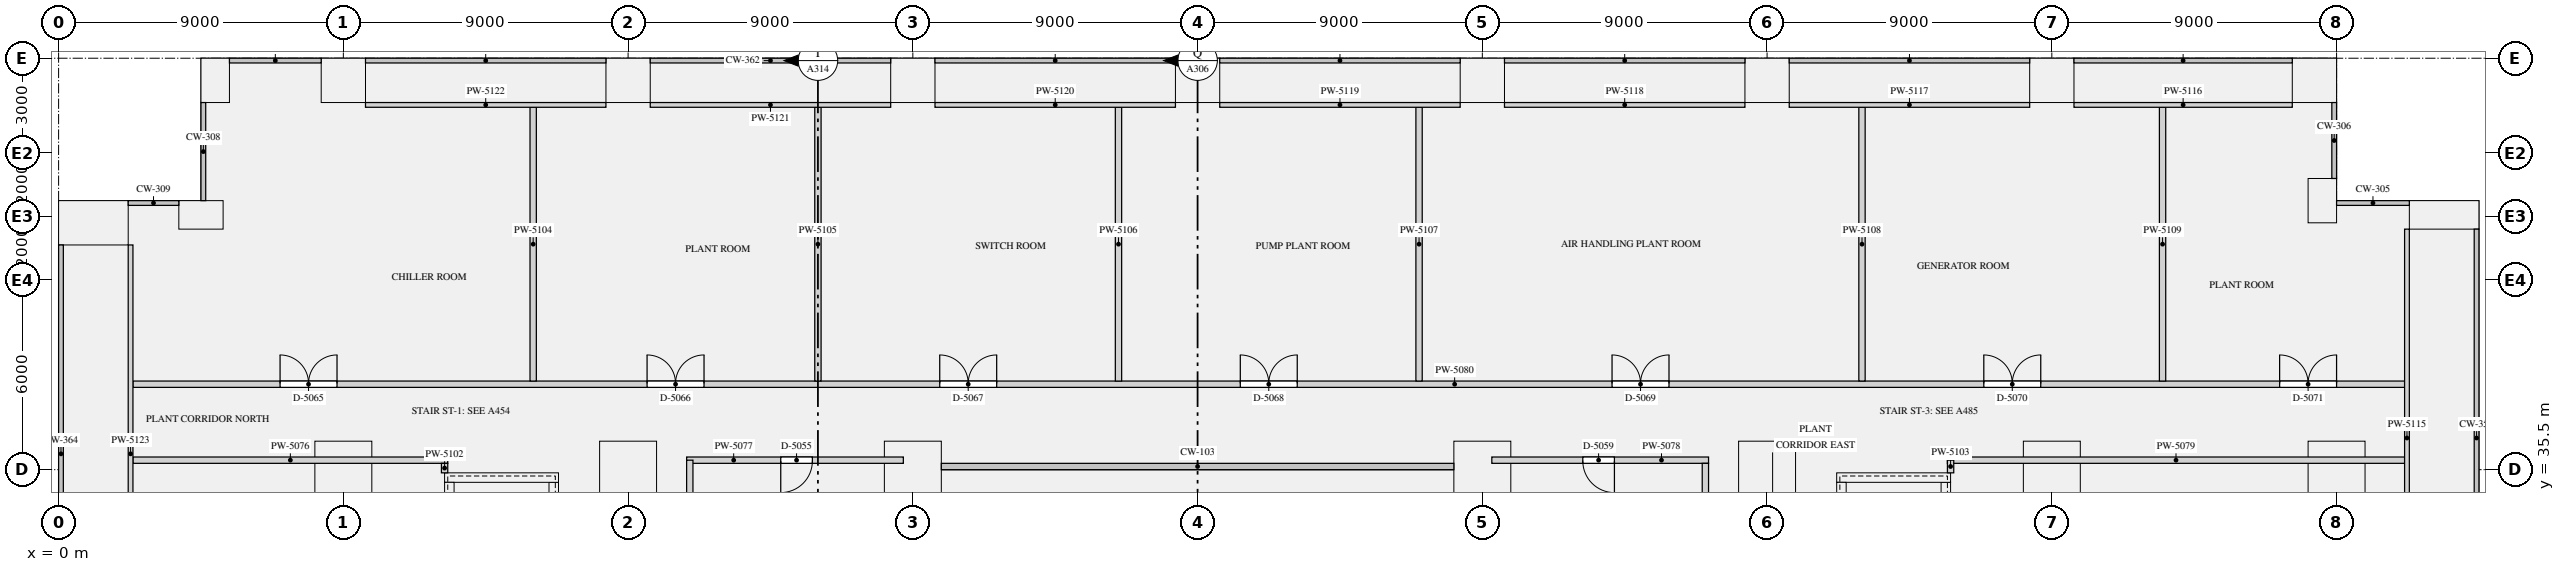
"""IFC4 building model, lengths in metres.
Left out: names, types, materials, properties, quantities, classifications, styles, units other than length and angle.
Written with IfcOpenShell. Run it as: python <this file> out.ifc"""

import sys

from ifc_helpers import new_model, si_unit, direction, frame, frame_2d, origin, origin_2d, place, context, subcontext, project, spatial, rectangle, extrude, element, fill, save


model = new_model("IFC4")
c1 = context("Model", 3, precision=1e-05, world=origin(), true_north=direction((0.0, 1.0)))
c2 = subcontext(c1, "Body", "Model", "MODEL_VIEW")
j1 = project(units=[si_unit("LENGTHUNIT", "METRE"), si_unit("PLANEANGLEUNIT", "RADIAN")], contexts=[c1])
p1 = place(None, origin())
s1 = spatial("IfcSite", under=j1, at=p1, CompositionType="ELEMENT")
p2 = place(p1, origin())
s2 = spatial("IfcBuilding", under=s1, at=p2, CompositionType="ELEMENT")
p3 = place(p2, frame((0.0, 0.0, 15.5)))
s3 = spatial("IfcBuildingStorey", under=s2, at=p3, CompositionType="ELEMENT", Elevation=15.5)
p4 = place(p3, frame((75.4, 43.55, 0.0), z_axis=(0.0, 0.0, 1.0), x_axis=(-1.0, 0.0, 0.0)))
e1 = element("IfcColumn", 1, at=p4, inside=s3, PredefinedType="USERDEFINED", context=c2, shape_type="SweptSolid", body=[
    extrude(rectangle(XDim=2.2, YDim=0.9, at=origin_2d()), origin(), (0.0, 0.0, 1.0), 4.0),
])
p5 = place(p3, frame((71.55, 44.0, 0.0), z_axis=(0.0, 0.0, 1.0), x_axis=(0.0, 1.0, 0.0)))
e2 = element("IfcColumn", 2, at=p5, inside=s3, PredefinedType="USERDEFINED", context=c2, shape_type="SweptSolid", body=[
    extrude(rectangle(XDim=1.4, YDim=0.9, at=origin_2d()), origin(), (0.0, 0.0, 1.0), 4.0),
])
for number, where, z_axis, x_axis in (
    (3, (71.3, 47.8, 0.0), (0.0, 0.0, 1.0), (-1.0, 0.0, 0.0)),
    (4, (63.0, 47.8, 0.0), (0.0, 0.0, 1.0), (-1.0, 0.0, 0.0)),
    (5, (54.0, 47.8, 0.0), (0.0, 0.0, 1.0), (-1.0, 0.0, 0.0)),
    (6, (45.0, 47.8, 0.0), (0.0, 0.0, 1.0), (-1.0, 0.0, 0.0)),
    (7, (36.0, 47.8, 0.0), (0.0, 0.0, 1.0), (-1.0, 0.0, 0.0)),
    (8, (27.0, 47.8, 0.0), (0.0, 0.0, 1.0), (-1.0, 0.0, 0.0)),
    (9, (18.0, 47.8, 0.0), (0.0, 0.0, 1.0), (-1.0, 0.0, 0.0)),
    (10, (9.0, 47.8, 0.0), (0.0, 0.0, 1.0), (-1.0, 0.0, 0.0)),
):
    element("IfcColumn", number, at=place(p3, frame(where, z_axis=z_axis, x_axis=x_axis)), inside=s3, PredefinedType="USERDEFINED", context=c2, shape_type="SweptSolid", body=[
        extrude(rectangle(XDim=1.4, YDim=1.4, at=origin_2d()), origin(), (0.0, 0.0, 1.0), 4.0),
    ])
for number, where, z_axis, x_axis in (
    (11, (4.95, 47.8, 0.0), (0.0, 0.0, 1.0), (0.0, -1.0, 0.0)),
    (12, (4.5, 43.55, 0.0), (0.0, 0.0, 1.0), (-1.0, 0.0, 0.0)),
):
    element("IfcColumn", number, at=place(p3, frame(where, z_axis=z_axis, x_axis=x_axis)), inside=s3, PredefinedType="USERDEFINED", context=c2, shape_type="SweptSolid", body=[
        extrude(rectangle(XDim=1.4, YDim=0.9, at=origin_2d()), origin(), (0.0, 0.0, 1.0), 4.0),
    ])
p6 = place(p3, frame((1.1, 43.3, 0.0), z_axis=(0.0, 0.0, 1.0), x_axis=(0.0, -1.0, 0.0)))
e13 = element("IfcColumn", 13, at=p6, inside=s3, PredefinedType="USERDEFINED", context=c2, shape_type="SweptSolid", body=[
    extrude(rectangle(XDim=1.4, YDim=2.2, at=origin_2d()), origin(), (0.0, 0.0, 1.0), 4.0),
])
for number, where, z_axis, x_axis in (
    (14, (9.0, 35.5, 0.0), (0.0, 0.0, 1.0), (1.0, 0.0, 0.0)),
    (15, (18.0, 35.5, 0.0), (0.0, 0.0, 1.0), (1.0, 0.0, 0.0)),
    (16, (27.0, 35.5, 0.0), (0.0, 0.0, 1.0), (1.0, 0.0, 0.0)),
    (17, (45.0, 35.5, 0.0), (0.0, 0.0, 1.0), (1.0, 0.0, 0.0)),
    (18, (54.0, 35.5, 0.0), (0.0, 0.0, 1.0), (1.0, 0.0, 0.0)),
    (19, (63.0, 35.5, 0.0), (0.0, 0.0, 1.0), (1.0, 0.0, 0.0)),
    (20, (72.0, 35.5, 0.0), (0.0, 0.0, 1.0), (1.0, 0.0, 0.0)),
):
    element("IfcColumn", number, at=place(p3, frame(where, z_axis=z_axis, x_axis=x_axis)), inside=s3, PredefinedType="COLUMN", context=c2, shape_type="SweptSolid", body=[
        extrude(rectangle(XDim=1.8, YDim=1.8, at=origin_2d()), origin(), (0.0, 0.0, 1.0), 4.0),
    ])
p7 = place(p3, frame((12.2, 35.25, 0.0), z_axis=(0.0, 0.0, 1.0), x_axis=(1.0, 0.0, 0.0)))
e21 = element("IfcWall", 21, at=p7, inside=s3, PredefinedType="SHEAR", context=c2, shape_type="SweptSolid", body=[
    extrude(rectangle(XDim=3.6, YDim=0.3, at=frame_2d((1.8, 0.0))), origin(), (0.0, 0.0, 1.0), 4.0),
])
for number, where, z_axis, x_axis in (
    (22, (12.35, 27.3, 0.0), (0.0, 0.0, 1.0), (0.0, 1.0, 0.0)),
    (23, (15.65, 27.3, 0.0), (0.0, 0.0, 1.0), (0.0, 1.0, 0.0)),
):
    element("IfcWall", number, at=place(p3, frame(where, z_axis=z_axis, x_axis=x_axis)), inside=s3, PredefinedType="SHEAR", context=c2, shape_type="SweptSolid", body=[
        extrude(rectangle(XDim=7.8, YDim=0.3, at=frame_2d((3.9, 0.0))), origin(), (0.0, 0.0, 1.0), 4.0),
    ])
p8 = place(p3, frame((56.2, 35.25, 0.0), z_axis=(0.0, 0.0, 1.0), x_axis=(1.0, 0.0, 0.0)))
e24 = element("IfcWall", 24, at=p8, inside=s3, PredefinedType="SHEAR", context=c2, shape_type="SweptSolid", body=[
    extrude(rectangle(XDim=3.6, YDim=0.3, at=frame_2d((1.8, 0.0))), origin(), (0.0, 0.0, 1.0), 4.0),
])
for number, where, z_axis, x_axis in (
    (25, (56.35, 27.3, 0.0), (0.0, 0.0, 1.0), (0.0, 1.0, 0.0)),
    (26, (59.65, 27.3, 0.0), (0.0, 0.0, 1.0), (0.0, 1.0, 0.0)),
):
    element("IfcWall", number, at=place(p3, frame(where, z_axis=z_axis, x_axis=x_axis)), inside=s3, PredefinedType="SHEAR", context=c2, shape_type="SweptSolid", body=[
        extrude(rectangle(XDim=7.8, YDim=0.3, at=frame_2d((3.9, 0.0))), origin(), (0.0, 0.0, 1.0), 4.0),
    ])
p9 = place(p3, frame((2.35, 35.8, 0.0), z_axis=(0.0, 0.0, 1.0), x_axis=(1.0, 0.0, 0.0)))
e27 = element("IfcWall", 27, at=p9, inside=s3, PredefinedType="PARTITIONING", context=c2, shape_type="SweptSolid", body=[
    extrude(rectangle(XDim=9.95, YDim=0.2, at=frame_2d((4.975, 0.0))), origin(), (0.0, 0.0, 1.0), 3.68),
])
p10 = place(p3, frame((19.85, 35.8, 0.0), z_axis=(0.0, 0.0, 1.0), x_axis=(1.0, 0.0, 0.0)))
e28 = element("IfcWall", 28, at=p10, inside=s3, PredefinedType="PARTITIONING", context=c2, shape_type="SweptSolid", body=[
    extrude(rectangle(XDim=6.85, YDim=0.2, at=frame_2d((3.425, 0.0))), origin(), (0.0, 0.0, 1.0), 3.68),
])
p11 = place(p10, frame((2.975, 0.0, 0.0)))
e29 = element("IfcOpeningElement", 29, at=p11, cuts=e28, PredefinedType="OPENING", context=c2, shape_type="SweptSolid", body=[
    extrude(rectangle(XDim=1.0, YDim=2.1, at=frame_2d((0.5, 1.05))), frame((0.0, 0.11, 0.0), z_axis=(0.0, -1.0, 0.0), x_axis=(1.0, 0.0, 0.0)), (0.0, 0.0, 1.0), 0.22),
])
p12 = place(p3, frame((45.3, 35.8, 0.0), z_axis=(0.0, 0.0, 1.0), x_axis=(1.0, 0.0, 0.0)))
e30 = element("IfcWall", 30, at=p12, inside=s3, PredefinedType="PARTITIONING", context=c2, shape_type="SweptSolid", body=[
    extrude(rectangle(XDim=6.85, YDim=0.2, at=frame_2d((3.425, 0.0))), origin(), (0.0, 0.0, 1.0), 3.68),
])
p13 = place(p12, frame((2.875, 0.0, 0.0)))
e31 = element("IfcOpeningElement", 31, at=p13, cuts=e30, PredefinedType="OPENING", context=c2, shape_type="SweptSolid", body=[
    extrude(rectangle(XDim=1.0, YDim=2.1, at=frame_2d((0.5, 1.05))), frame((0.0, 0.11, 0.0), z_axis=(0.0, -1.0, 0.0), x_axis=(1.0, 0.0, 0.0)), (0.0, 0.0, 1.0), 0.22),
])
p14 = place(p3, frame((59.7, 35.8, 0.0), z_axis=(0.0, 0.0, 1.0), x_axis=(1.0, 0.0, 0.0)))
e32 = element("IfcWall", 32, at=p14, inside=s3, PredefinedType="PARTITIONING", context=c2, shape_type="SweptSolid", body=[
    extrude(rectangle(XDim=14.45, YDim=0.2, at=frame_2d((7.225, 0.0))), origin(), (0.0, 0.0, 1.0), 3.68),
])
p15 = place(p3, frame((2.35, 38.2, 0.0), z_axis=(0.0, 0.0, 1.0), x_axis=(1.0, 0.0, 0.0)))
e33 = element("IfcWall", 33, at=p15, inside=s3, PredefinedType="PARTITIONING", context=c2, shape_type="SweptSolid", body=[
    extrude(rectangle(XDim=71.8, YDim=0.2, at=frame_2d((35.9, 0.0))), origin(), (0.0, 0.0, 1.0), 3.68),
])
p16 = place(p15, frame((4.65, 0.0, 0.0)))
e34 = element("IfcOpeningElement", 34, at=p16, cuts=e33, PredefinedType="OPENING", context=c2, shape_type="SweptSolid", body=[
    extrude(rectangle(XDim=1.8, YDim=2.1, at=frame_2d((0.9, 1.05))), frame((0.0, 0.11, 0.0), z_axis=(0.0, -1.0, 0.0), x_axis=(1.0, 0.0, 0.0)), (0.0, 0.0, 1.0), 0.22),
])
p17 = place(p15, frame((16.25, 0.0, 0.0)))
e35 = element("IfcOpeningElement", 35, at=p17, cuts=e33, PredefinedType="OPENING", context=c2, shape_type="SweptSolid", body=[
    extrude(rectangle(XDim=1.8, YDim=2.1, at=frame_2d((0.9, 1.05))), frame((0.0, 0.11, 0.0), z_axis=(0.0, -1.0, 0.0), x_axis=(1.0, 0.0, 0.0)), (0.0, 0.0, 1.0), 0.22),
])
p18 = place(p15, frame((25.5, 0.0, 0.0)))
e36 = element("IfcOpeningElement", 36, at=p18, cuts=e33, PredefinedType="OPENING", context=c2, shape_type="SweptSolid", body=[
    extrude(rectangle(XDim=1.8, YDim=2.1, at=frame_2d((0.9, 1.05))), frame((0.0, 0.11, 0.0), z_axis=(0.0, -1.0, 0.0), x_axis=(1.0, 0.0, 0.0)), (0.0, 0.0, 1.0), 0.22),
])
p19 = place(p15, frame((35.0, 0.0, 0.0)))
e37 = element("IfcOpeningElement", 37, at=p19, cuts=e33, PredefinedType="OPENING", context=c2, shape_type="SweptSolid", body=[
    extrude(rectangle(XDim=1.8, YDim=2.1, at=frame_2d((0.9, 1.05))), frame((0.0, 0.11, 0.0), z_axis=(0.0, -1.0, 0.0), x_axis=(1.0, 0.0, 0.0)), (0.0, 0.0, 1.0), 0.22),
])
p20 = place(p15, frame((46.75, 0.0, 0.0)))
e38 = element("IfcOpeningElement", 38, at=p20, cuts=e33, PredefinedType="OPENING", context=c2, shape_type="SweptSolid", body=[
    extrude(rectangle(XDim=1.8, YDim=2.1, at=frame_2d((0.9, 1.05))), frame((0.0, 0.11, 0.0), z_axis=(0.0, -1.0, 0.0), x_axis=(1.0, 0.0, 0.0)), (0.0, 0.0, 1.0), 0.22),
])
p21 = place(p15, frame((58.5, 0.0, 0.0)))
e39 = element("IfcOpeningElement", 39, at=p21, cuts=e33, PredefinedType="OPENING", context=c2, shape_type="SweptSolid", body=[
    extrude(rectangle(XDim=1.8, YDim=2.1, at=frame_2d((0.9, 1.05))), frame((0.0, 0.11, 0.0), z_axis=(0.0, -1.0, 0.0), x_axis=(1.0, 0.0, 0.0)), (0.0, 0.0, 1.0), 0.22),
])
p22 = place(p15, frame((67.85, 0.0, 0.0)))
e40 = element("IfcOpeningElement", 40, at=p22, cuts=e33, PredefinedType="OPENING", context=c2, shape_type="SweptSolid", body=[
    extrude(rectangle(XDim=1.8, YDim=2.1, at=frame_2d((0.9, 1.05))), frame((0.0, 0.11, 0.0), z_axis=(0.0, -1.0, 0.0), x_axis=(1.0, 0.0, 0.0)), (0.0, 0.0, 1.0), 0.22),
])
p23 = place(p3, frame((19.95, 23.0, 0.0), z_axis=(0.0, 0.0, 1.0), x_axis=(0.0, 1.0, 0.0)))
e41 = element("IfcWall", 41, at=p23, inside=s3, PredefinedType="PARTITIONING", context=c2, shape_type="SweptSolid", body=[
    extrude(rectangle(XDim=12.8, YDim=0.2, at=frame_2d((6.4, 0.0))), origin(), (0.0, 0.0, 1.0), 3.68),
])
p24 = place(p23, frame((2.75, 0.0, 0.0)))
e42 = element("IfcOpeningElement", 42, at=p24, cuts=e41, PredefinedType="OPENING", context=c2, shape_type="SweptSolid", body=[
    extrude(rectangle(XDim=1.0, YDim=2.1, at=frame_2d((0.5, 1.05))), frame((0.0, 0.11, 0.0), z_axis=(0.0, -1.0, 0.0), x_axis=(1.0, 0.0, 0.0)), (0.0, 0.0, 1.0), 0.22),
])
p25 = place(p3, frame((52.05, 30.6, 0.0), z_axis=(0.0, 0.0, 1.0), x_axis=(0.0, 1.0, 0.0)))
e43 = element("IfcWall", 43, at=p25, inside=s3, PredefinedType="PARTITIONING", context=c2, shape_type="SweptSolid", body=[
    extrude(rectangle(XDim=5.1, YDim=0.2, at=frame_2d((2.55, 0.0))), origin(), (0.0, 0.0, 1.0), 3.68),
])
p26 = place(p3, frame((12.2, 35.4, 0.0), z_axis=(0.0, 0.0, 1.0), x_axis=(0.0, 1.0, 0.0)))
e44 = element("IfcWall", 44, at=p26, inside=s3, PredefinedType="PARTITIONING", context=c2, shape_type="SweptSolid", body=[
    extrude(rectangle(XDim=0.3, YDim=0.2, at=frame_2d((0.15, 0.0))), origin(), (0.0, 0.0, 1.0), 3.68),
])
p27 = place(p3, frame((59.8, 35.4, 0.0), z_axis=(0.0, 0.0, 1.0), x_axis=(0.0, 1.0, 0.0)))
e45 = element("IfcWall", 45, at=p27, inside=s3, PredefinedType="PARTITIONING", context=c2, shape_type="SweptSolid", body=[
    extrude(rectangle(XDim=0.4, YDim=0.2, at=frame_2d((0.2, 0.0))), origin(), (0.0, 0.0, 1.0), 3.68),
])
for number, where, z_axis, x_axis in (
    (46, (15.0, 38.3, 0.0), (0.0, 0.0, 1.0), (0.0, 1.0, 0.0)),
    (47, (24.0, 38.3, 0.0), (0.0, 0.0, 1.0), (0.0, 1.0, 0.0)),
    (48, (33.5, 38.3, 0.0), (0.0, 0.0, 1.0), (0.0, 1.0, 0.0)),
    (49, (43.0, 38.3, 0.0), (0.0, 0.0, 1.0), (0.0, 1.0, 0.0)),
    (50, (57.0, 38.3, 0.0), (0.0, 0.0, 1.0), (0.0, 1.0, 0.0)),
    (51, (66.5, 38.3, 0.0), (0.0, 0.0, 1.0), (0.0, 1.0, 0.0)),
):
    element("IfcWall", number, at=place(p3, frame(where, z_axis=z_axis, x_axis=x_axis)), inside=s3, PredefinedType="PARTITIONING", context=c2, shape_type="SweptSolid", body=[
        extrude(rectangle(XDim=8.65, YDim=0.2, at=frame_2d((4.325, 0.0))), origin(), (0.0, 0.0, 1.0), 3.68),
    ])
p28 = place(p3, frame((74.225, 29.9, 0.0), z_axis=(0.0, 0.0, 1.0), x_axis=(0.0, 1.0, 0.0)))
e52 = element("IfcWall", 52, at=p28, inside=s3, PredefinedType="PARTITIONING", context=c2, shape_type="SweptSolid", body=[
    extrude(rectangle(XDim=13.2, YDim=0.15, at=frame_2d((6.6, 0.0))), origin(), (0.0, 0.0, 1.0), 3.68),
])
p29 = place(p3, frame((63.7, 47.025, 0.0), z_axis=(0.0, 0.0, 1.0), x_axis=(1.0, 0.0, 0.0)))
e53 = element("IfcWall", 53, at=p29, inside=s3, PredefinedType="PARTITIONING", context=c2, shape_type="SweptSolid", body=[
    extrude(rectangle(XDim=6.9, YDim=0.15, at=frame_2d((3.45, 0.0))), origin(), (0.0, 0.0, 1.0), 3.68),
])
for number, where, z_axis, x_axis in (
    (54, (54.7, 47.025, 0.0), (0.0, 0.0, 1.0), (1.0, 0.0, 0.0)),
    (55, (45.7, 47.025, 0.0), (0.0, 0.0, 1.0), (1.0, 0.0, 0.0)),
    (56, (36.7, 47.025, 0.0), (0.0, 0.0, 1.0), (1.0, 0.0, 0.0)),
    (57, (27.7, 47.025, 0.0), (0.0, 0.0, 1.0), (1.0, 0.0, 0.0)),
    (58, (18.7, 47.025, 0.0), (0.0, 0.0, 1.0), (1.0, 0.0, 0.0)),
    (59, (9.7, 47.025, 0.0), (0.0, 0.0, 1.0), (1.0, 0.0, 0.0)),
):
    element("IfcWall", number, at=place(p3, frame(where, z_axis=z_axis, x_axis=x_axis)), inside=s3, PredefinedType="PARTITIONING", context=c2, shape_type="SweptSolid", body=[
        extrude(rectangle(XDim=7.6, YDim=0.15, at=frame_2d((3.8, 0.0))), origin(), (0.0, 0.0, 1.0), 3.68),
    ])
p30 = place(p3, frame((2.275, 29.4, 0.0), z_axis=(0.0, 0.0, 1.0), x_axis=(0.0, 1.0, 0.0)))
e60 = element("IfcWall", 60, at=p30, inside=s3, PredefinedType="PARTITIONING", context=c2, shape_type="SweptSolid", body=[
    extrude(rectangle(XDim=13.2, YDim=0.15, at=frame_2d((6.6, 0.0))), origin(), (0.0, 0.0, 1.0), 3.68),
])
p31 = place(p11, frame((1.0, 0.0, 0.0), z_axis=(0.0, 0.0, 1.0), x_axis=(-1.0, 0.0, 0.0)))
e61 = element("IfcDoor", 61, at=p31, inside=s3, OperationType="SINGLE_SWING_RIGHT", PredefinedType="DOOR", context=c2, shape_type="SweptSolid", body=[
    extrude(rectangle(XDim=1.0, YDim=2.1, at=frame_2d((0.5, 1.05))), frame((0.0, 0.025, 0.0), z_axis=(0.0, -1.0, 0.0), x_axis=(1.0, 0.0, 0.0)), (0.0, 0.0, 1.0), 0.05),
])
fill(e29, e61)
p32 = place(p13, frame((1.0, 0.0, 0.0), z_axis=(0.0, 0.0, 1.0), x_axis=(-1.0, 0.0, 0.0)))
e62 = element("IfcDoor", 62, at=p32, inside=s3, OperationType="SINGLE_SWING_LEFT", PredefinedType="DOOR", context=c2, shape_type="SweptSolid", body=[
    extrude(rectangle(XDim=1.0, YDim=2.1, at=frame_2d((0.5, 1.05))), frame((0.0, 0.025, 0.0), z_axis=(0.0, -1.0, 0.0), x_axis=(1.0, 0.0, 0.0)), (0.0, 0.0, 1.0), 0.05),
])
fill(e31, e62)
p33 = place(p16, origin())
e63 = element("IfcDoor", 63, at=p33, inside=s3, OperationType="DOUBLE_DOOR_SINGLE_SWING", PredefinedType="DOOR", context=c2, shape_type="SweptSolid", body=[
    extrude(rectangle(XDim=1.8, YDim=2.1, at=frame_2d((0.9, 1.05))), frame((0.0, 0.025, 0.0), z_axis=(0.0, -1.0, 0.0), x_axis=(1.0, 0.0, 0.0)), (0.0, 0.0, 1.0), 0.05),
])
fill(e34, e63)
p34 = place(p17, origin())
e64 = element("IfcDoor", 64, at=p34, inside=s3, OperationType="DOUBLE_DOOR_SINGLE_SWING", PredefinedType="DOOR", context=c2, shape_type="SweptSolid", body=[
    extrude(rectangle(XDim=1.8, YDim=2.1, at=frame_2d((0.9, 1.05))), frame((0.0, 0.025, 0.0), z_axis=(0.0, -1.0, 0.0), x_axis=(1.0, 0.0, 0.0)), (0.0, 0.0, 1.0), 0.05),
])
fill(e35, e64)
p35 = place(p18, origin())
e65 = element("IfcDoor", 65, at=p35, inside=s3, OperationType="DOUBLE_DOOR_SINGLE_SWING", PredefinedType="DOOR", context=c2, shape_type="SweptSolid", body=[
    extrude(rectangle(XDim=1.8, YDim=2.1, at=frame_2d((0.9, 1.05))), frame((0.0, 0.025, 0.0), z_axis=(0.0, -1.0, 0.0), x_axis=(1.0, 0.0, 0.0)), (0.0, 0.0, 1.0), 0.05),
])
fill(e36, e65)
p36 = place(p19, origin())
e66 = element("IfcDoor", 66, at=p36, inside=s3, OperationType="DOUBLE_DOOR_SINGLE_SWING", PredefinedType="DOOR", context=c2, shape_type="SweptSolid", body=[
    extrude(rectangle(XDim=1.8, YDim=2.1, at=frame_2d((0.9, 1.05))), frame((0.0, 0.025, 0.0), z_axis=(0.0, -1.0, 0.0), x_axis=(1.0, 0.0, 0.0)), (0.0, 0.0, 1.0), 0.05),
])
fill(e37, e66)
p37 = place(p20, origin())
e67 = element("IfcDoor", 67, at=p37, inside=s3, OperationType="DOUBLE_DOOR_SINGLE_SWING", PredefinedType="DOOR", context=c2, shape_type="SweptSolid", body=[
    extrude(rectangle(XDim=1.8, YDim=2.1, at=frame_2d((0.9, 1.05))), frame((0.0, 0.025, 0.0), z_axis=(0.0, -1.0, 0.0), x_axis=(1.0, 0.0, 0.0)), (0.0, 0.0, 1.0), 0.05),
])
fill(e38, e67)
p38 = place(p21, origin())
e68 = element("IfcDoor", 68, at=p38, inside=s3, OperationType="DOUBLE_DOOR_SINGLE_SWING", PredefinedType="DOOR", context=c2, shape_type="SweptSolid", body=[
    extrude(rectangle(XDim=1.8, YDim=2.1, at=frame_2d((0.9, 1.05))), frame((0.0, 0.025, 0.0), z_axis=(0.0, -1.0, 0.0), x_axis=(1.0, 0.0, 0.0)), (0.0, 0.0, 1.0), 0.05),
])
fill(e39, e68)
p39 = place(p22, origin())
e69 = element("IfcDoor", 69, at=p39, inside=s3, OperationType="DOUBLE_DOOR_SINGLE_SWING", PredefinedType="DOOR", context=c2, shape_type="SweptSolid", body=[
    extrude(rectangle(XDim=1.8, YDim=2.1, at=frame_2d((0.9, 1.05))), frame((0.0, 0.025, 0.0), z_axis=(0.0, -1.0, 0.0), x_axis=(1.0, 0.0, 0.0)), (0.0, 0.0, 1.0), 0.05),
])
fill(e40, e69)
save(model, sys.argv[1])
